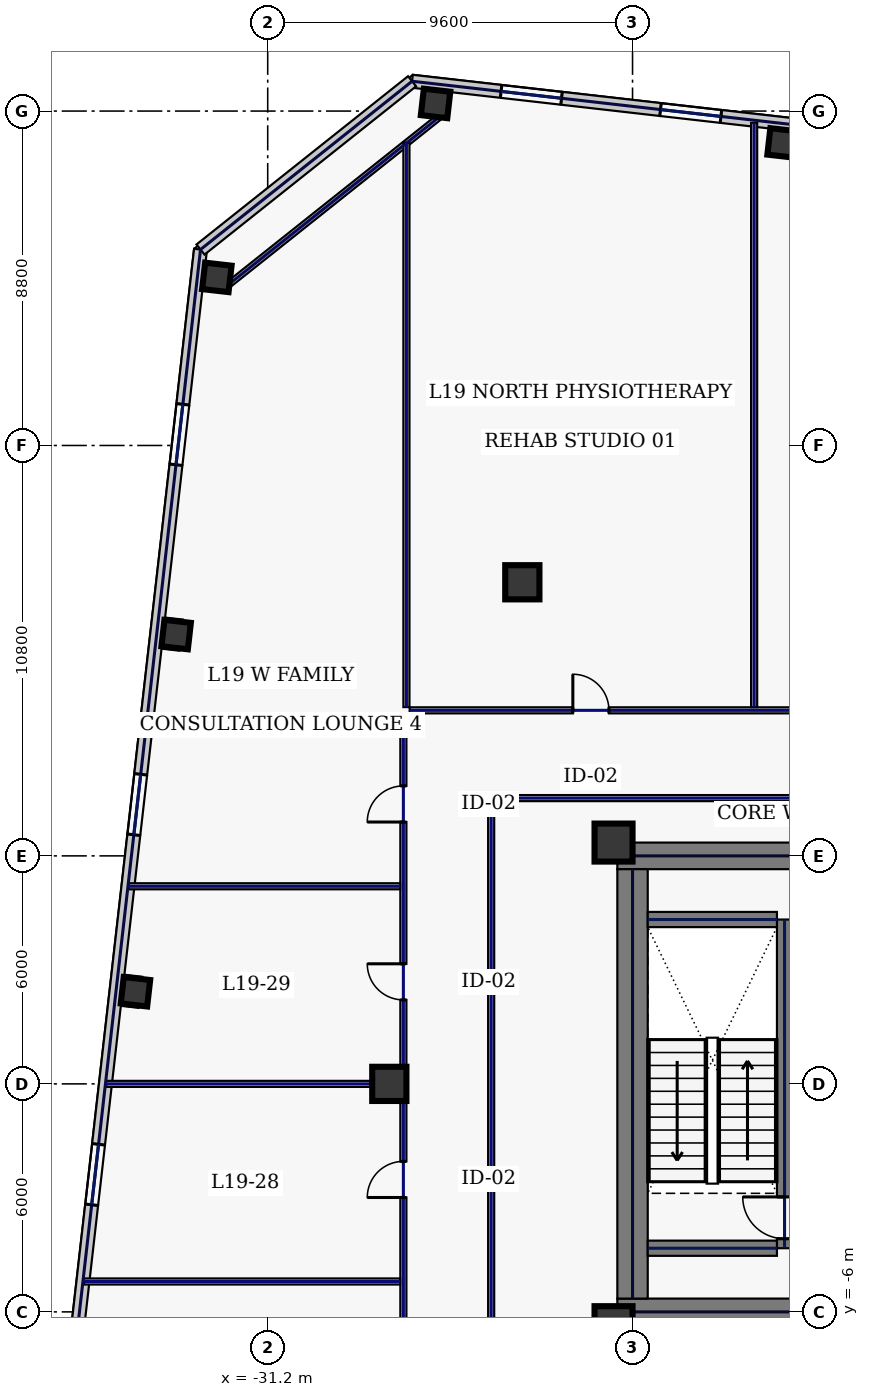
"""IFC4 building model, lengths in metres.
Left out: names, types, materials, properties, quantities, classifications, styles, units other than length and angle.
Written with IfcOpenShell. Run it as: python <this file> out.ifc"""

import sys

from ifc_helpers import new_model, si_unit, direction, frame, frame_2d, origin, origin_2d, place, context, subcontext, project, spatial, rectangle, hollow_rectangle, extrude, element, fill, save


model = new_model("IFC4")
c1 = context("Model", 3, precision=1e-05, world=origin(), true_north=direction((0.0, 1.0)))
c2 = subcontext(c1, "Body", "Model", "MODEL_VIEW")
j1 = project(units=[si_unit("LENGTHUNIT", "METRE"), si_unit("PLANEANGLEUNIT", "RADIAN")], contexts=[c1])
p1 = place(None, origin())
s1 = spatial("IfcSite", under=j1, at=p1, CompositionType="ELEMENT")
p2 = place(p1, origin())
s2 = spatial("IfcBuilding", under=s1, at=p2, CompositionType="ELEMENT")
p3 = place(p2, frame((0.0, 0.0, 89.4)))
s3 = spatial("IfcBuildingStorey", under=s2, at=p3, CompositionType="ELEMENT", Elevation=89.4)
for number, where, z_axis, x_axis in (
    (1, (-22.0, 6.0, 0.0), (0.0, 0.0, 1.0), (1.0, 0.0, 0.0)),
    (2, (-22.0, -6.0, 0.0), (0.0, 0.0, 1.0), (1.0, 0.0, 0.0)),
):
    element("IfcWall", number, at=place(p3, frame(where, z_axis=z_axis, x_axis=x_axis)), inside=s3, PredefinedType="SHEAR", context=c2, shape_type="SweptSolid", body=[
        extrude(rectangle(XDim=11.55, YDim=0.7, at=frame_2d((5.775, 0.0))), origin(), (0.0, 0.0, 1.0), 3.74),
    ])
p4 = place(p3, frame((-21.6, -5.65, 0.0), z_axis=(0.0, 0.0, 1.0), x_axis=(0.0, 1.0, 0.0)))
e3 = element("IfcWall", 3, at=p4, inside=s3, PredefinedType="SHEAR", context=c2, shape_type="SweptSolid", body=[
    extrude(rectangle(XDim=11.3, YDim=0.8, at=frame_2d((5.65, 0.0))), origin(), (0.0, 0.0, 1.0), 3.74),
])
p5 = place(p3, frame((-17.6, -4.325, 0.0), z_axis=(0.0, 0.0, 1.0), x_axis=(0.0, 1.0, 0.0)))
e4 = element("IfcWall", 4, at=p5, inside=s3, PredefinedType="SHEAR", context=c2, shape_type="SweptSolid", body=[
    extrude(rectangle(XDim=8.65, YDim=0.4, at=frame_2d((4.325, 0.0))), origin(), (0.0, 0.0, 1.0), 3.74),
])
p6 = place(p5, frame((0.25, 0.0, 0.0)))
e5 = element("IfcOpeningElement", 5, at=p6, cuts=e4, PredefinedType="OPENING", context=c2, shape_type="SweptSolid", body=[
    extrude(rectangle(XDim=1.1, YDim=2.2, at=frame_2d((0.55, 1.1))), frame((0.0, 0.21, 0.0), z_axis=(0.0, -1.0, 0.0), x_axis=(1.0, 0.0, 0.0)), (0.0, 0.0, 1.0), 0.42),
])
for number, where, z_axis, x_axis in (
    (6, (-21.2, -4.325, 0.0), (0.0, 0.0, 1.0), (1.0, 0.0, 0.0)),
    (7, (-21.2, 4.325, 0.0), (0.0, 0.0, 1.0), (1.0, 0.0, 0.0)),
):
    element("IfcWall", number, at=place(p3, frame(where, z_axis=z_axis, x_axis=x_axis)), inside=s3, PredefinedType="SHEAR", context=c2, shape_type="SweptSolid", body=[
        extrude(rectangle(XDim=3.4, YDim=0.4, at=frame_2d((1.7, 0.0))), origin(), (0.0, 0.0, 1.0), 3.74),
    ])
for number, where, z_axis, x_axis in (
    (8, (-22.1, -6.35, 0.0), (0.0, 0.0, 1.0), (1.0, 0.0, 0.0)),
    (9, (-22.1, 6.35, 0.0), (0.0, 0.0, 1.0), (1.0, 0.0, 0.0)),
):
    element("IfcColumn", number, at=place(p3, frame(where, z_axis=z_axis, x_axis=x_axis)), inside=s3, PredefinedType="COLUMN", context=c2, shape_type="SweptSolid", body=[
        extrude(hollow_rectangle(XDim=1.0, YDim=1.0, WallThickness=0.045, at=origin_2d()), origin(), (0.0, 0.0, 1.0), 3.74),
    ])
for number, where, z_axis, x_axis in (
    (10, (-24.5, 13.2, 0.0), (0.0, 0.0, 1.0), (1.0, 0.0, 0.0)),
    (11, (-28.0, 0.0, 0.0), (0.0, 0.0, 1.0), (1.0, 0.0, 0.0)),
):
    element("IfcColumn", number, at=place(p3, frame(where, z_axis=z_axis, x_axis=x_axis)), inside=s3, PredefinedType="COLUMN", context=c2, shape_type="SweptSolid", body=[
        extrude(hollow_rectangle(XDim=0.9, YDim=0.9, WallThickness=0.04, at=origin_2d()), origin(), (0.0, 0.0, 1.0), 3.74),
    ])
for number, where, z_axis, x_axis in (
    (12, (-17.665, 24.762, 0.0), (0.0, 0.0, 1.0), (0.994, -0.113, 0.0)),
    (13, (-26.783, 25.801, 0.0), (0.0, 0.0, 1.0), (0.994, -0.113, 0.0)),
    (14, (-32.538, 21.223, 0.0), (0.0, 0.0, 1.0), (0.994, -0.113, 0.0)),
    (15, (-33.609, 11.824, 0.0), (0.0, 0.0, 1.0), (0.994, -0.113, 0.0)),
    (16, (-34.68, 2.425, 0.0), (0.0, 0.0, 1.0), (0.994, -0.113, 0.0)),
):
    element("IfcColumn", number, at=place(p3, frame(where, z_axis=z_axis, x_axis=x_axis)), inside=s3, PredefinedType="COLUMN", context=c2, shape_type="SweptSolid", body=[
        extrude(hollow_rectangle(XDim=0.7, YDim=0.7, WallThickness=0.032, at=origin_2d()), origin(), (0.0, 0.0, 1.0), 3.74),
    ])
p7 = place(p3, frame((-6.314, 23.982, 0.0), z_axis=(0.0, 0.0, 1.0), x_axis=(-0.993571362037, 0.113207546299, 0.0)))
e17 = element("IfcWall", 17, at=p7, inside=s3, PredefinedType="STANDARD", context=c2, shape_type="SweptSolid", body=[
    extrude(rectangle(XDim=21.223, YDim=0.34, at=frame_2d((10.611, 0.0))), origin(), (0.0, 0.0, 1.0), 3.74),
])
p8 = place(p7, frame((17.265, 0.0, 0.22)))
e18 = element("IfcOpeningElement", 18, at=p8, cuts=e17, PredefinedType="OPENING", context=c2, shape_type="SweptSolid", body=[
    extrude(rectangle(XDim=1.6, YDim=1.2, at=frame_2d((0.8, 0.6))), frame((0.0, 0.18, 0.0), z_axis=(0.0, -1.0, 0.0), x_axis=(1.0, 0.0, 0.0)), (0.0, 0.0, 1.0), 0.36),
])
p9 = place(p7, frame((13.044, 0.0, 0.22)))
e19 = element("IfcOpeningElement", 19, at=p9, cuts=e17, PredefinedType="OPENING", context=c2, shape_type="SweptSolid", body=[
    extrude(rectangle(XDim=1.6, YDim=1.2, at=frame_2d((0.8, 0.6))), frame((0.0, 0.18, 0.0), z_axis=(0.0, -1.0, 0.0), x_axis=(1.0, 0.0, 0.0)), (0.0, 0.0, 1.0), 0.36),
])
p10 = place(p7, frame((8.088, 0.0, 0.22)))
e20 = element("IfcOpeningElement", 20, at=p10, cuts=e17, PredefinedType="OPENING", context=c2, shape_type="SweptSolid", body=[
    extrude(rectangle(XDim=1.6, YDim=1.2, at=frame_2d((0.8, 0.6))), frame((0.0, 0.18, 0.0), z_axis=(0.0, -1.0, 0.0), x_axis=(1.0, 0.0, 0.0)), (0.0, 0.0, 1.0), 0.36),
])
p11 = place(p7, frame((3.866, 0.0, 0.22)))
e21 = element("IfcOpeningElement", 21, at=p11, cuts=e17, PredefinedType="OPENING", context=c2, shape_type="SweptSolid", body=[
    extrude(rectangle(XDim=1.6, YDim=1.2, at=frame_2d((0.8, 0.6))), frame((0.0, 0.18, 0.0), z_axis=(0.0, -1.0, 0.0), x_axis=(1.0, 0.0, 0.0)), (0.0, 0.0, 1.0), 0.36),
])
p12 = place(p3, frame((-32.968, 21.957, 0.0), z_axis=(0.0, 0.0, 1.0), x_axis=(-0.113201605824, -0.993572038877, 0.0)))
e22 = element("IfcWall", 22, at=p12, inside=s3, PredefinedType="STANDARD", context=c2, shape_type="SweptSolid", body=[
    extrude(rectangle(XDim=39.2, YDim=0.34, at=frame_2d((19.6, 0.0))), origin(), (0.0, 0.0, 1.0), 3.74),
])
p13 = place(p12, frame((4.1, 0.0, 0.22)))
e23 = element("IfcOpeningElement", 23, at=p13, cuts=e22, PredefinedType="OPENING", context=c2, shape_type="SweptSolid", body=[
    extrude(rectangle(XDim=1.6, YDim=1.2, at=frame_2d((0.8, 0.6))), frame((0.0, 0.18, 0.0), z_axis=(0.0, -1.0, 0.0), x_axis=(1.0, 0.0, 0.0)), (0.0, 0.0, 1.0), 0.36),
])
p14 = place(p12, frame((13.9, 0.0, 0.22)))
e24 = element("IfcOpeningElement", 24, at=p14, cuts=e22, PredefinedType="OPENING", context=c2, shape_type="SweptSolid", body=[
    extrude(rectangle(XDim=1.6, YDim=1.2, at=frame_2d((0.8, 0.6))), frame((0.0, 0.18, 0.0), z_axis=(0.0, -1.0, 0.0), x_axis=(1.0, 0.0, 0.0)), (0.0, 0.0, 1.0), 0.36),
])
p15 = place(p12, frame((23.7, 0.0, 0.22)))
e25 = element("IfcOpeningElement", 25, at=p15, cuts=e22, PredefinedType="OPENING", context=c2, shape_type="SweptSolid", body=[
    extrude(rectangle(XDim=1.6, YDim=1.2, at=frame_2d((0.8, 0.6))), frame((0.0, 0.18, 0.0), z_axis=(0.0, -1.0, 0.0), x_axis=(1.0, 0.0, 0.0)), (0.0, 0.0, 1.0), 0.36),
])
p16 = place(p12, frame((33.5, 0.0, 0.22)))
e26 = element("IfcOpeningElement", 26, at=p16, cuts=e22, PredefinedType="OPENING", context=c2, shape_type="SweptSolid", body=[
    extrude(rectangle(XDim=1.6, YDim=1.2, at=frame_2d((0.8, 0.6))), frame((0.0, 0.18, 0.0), z_axis=(0.0, -1.0, 0.0), x_axis=(1.0, 0.0, 0.0)), (0.0, 0.0, 1.0), 0.36),
])
p17 = place(p3, frame((-27.401, 26.385, 0.0), z_axis=(0.0, 0.0, 1.0), x_axis=(-0.78261359446, -0.622507800567, 0.0)))
e27 = element("IfcWall", 27, at=p17, inside=s3, PredefinedType="STANDARD", context=c2, shape_type="SweptSolid", body=[
    extrude(rectangle(XDim=7.114, YDim=0.34, at=frame_2d((3.557, 0.0))), origin(), (0.0, 0.0, 1.0), 3.74),
])
p18 = place(p3, frame((-26.571, 25.535, 0.0), z_axis=(0.0, 0.0, 1.0), x_axis=(-0.782617962887, -0.622502308564, 0.0)))
e28 = element("IfcWall", 28, at=p18, inside=s3, PredefinedType="PARTITIONING", context=c2, shape_type="SweptSolid", body=[
    extrude(rectangle(XDim=7.354, YDim=0.16, at=frame_2d((3.677, 0.0))), origin(), (0.0, 0.0, 1.0), 1.535),
])
p19 = place(p3, frame((-27.63, -9.615, 0.0), z_axis=(0.0, 0.0, 1.0), x_axis=(0.0, 1.0, 0.0)))
e29 = element("IfcWall", 29, at=p19, inside=s3, PredefinedType="PARTITIONING", context=c2, shape_type="SweptSolid", body=[
    extrude(rectangle(XDim=19.28, YDim=0.16, at=frame_2d((9.64, 0.0))), origin(), (0.0, 0.0, 1.0), 3.74),
])
p20 = place(p19, frame((1.969, 0.0, 0.0)))
e30 = element("IfcOpeningElement", 30, at=p20, cuts=e29, PredefinedType="OPENING", context=c2, shape_type="SweptSolid", body=[
    extrude(rectangle(XDim=0.95, YDim=2.2, at=frame_2d((0.475, 1.1))), frame((0.0, 0.09, 0.0), z_axis=(0.0, -1.0, 0.0), x_axis=(1.0, 0.0, 0.0)), (0.0, 0.0, 1.0), 0.18),
])
p21 = place(p19, frame((6.625, 0.0, 0.0)))
e31 = element("IfcOpeningElement", 31, at=p21, cuts=e29, PredefinedType="OPENING", context=c2, shape_type="SweptSolid", body=[
    extrude(rectangle(XDim=0.95, YDim=2.2, at=frame_2d((0.475, 1.1))), frame((0.0, 0.09, 0.0), z_axis=(0.0, -1.0, 0.0), x_axis=(1.0, 0.0, 0.0)), (0.0, 0.0, 1.0), 0.18),
])
p22 = place(p19, frame((11.825, 0.0, 0.0)))
e32 = element("IfcOpeningElement", 32, at=p22, cuts=e29, PredefinedType="OPENING", context=c2, shape_type="SweptSolid", body=[
    extrude(rectangle(XDim=0.95, YDim=2.2, at=frame_2d((0.475, 1.1))), frame((0.0, 0.09, 0.0), z_axis=(0.0, -1.0, 0.0), x_axis=(1.0, 0.0, 0.0)), (0.0, 0.0, 1.0), 0.18),
])
p23 = place(p19, frame((16.506, 0.0, 0.0)))
e33 = element("IfcOpeningElement", 33, at=p23, cuts=e29, PredefinedType="OPENING", context=c2, shape_type="SweptSolid", body=[
    extrude(rectangle(XDim=0.95, YDim=2.2, at=frame_2d((0.475, 1.1))), frame((0.0, 0.09, 0.0), z_axis=(0.0, -1.0, 0.0), x_axis=(1.0, 0.0, 0.0)), (0.0, 0.0, 1.0), 0.18),
])
p24 = place(p3, frame((-27.465, 9.83, 0.0), z_axis=(0.0, 0.0, 1.0), x_axis=(1.0, 0.0, 0.0)))
e34 = element("IfcWall", 34, at=p24, inside=s3, PredefinedType="PARTITIONING", context=c2, shape_type="SweptSolid", body=[
    extrude(rectangle(XDim=54.93, YDim=0.16, at=frame_2d((27.465, 0.0))), origin(), (0.0, 0.0, 1.0), 3.74),
])
p25 = place(p24, frame((4.294, 0.0, 0.0)))
e35 = element("IfcOpeningElement", 35, at=p25, cuts=e34, PredefinedType="OPENING", context=c2, shape_type="SweptSolid", body=[
    extrude(rectangle(XDim=0.95, YDim=2.2, at=frame_2d((0.475, 1.1))), frame((0.0, 0.09, 0.0), z_axis=(0.0, -1.0, 0.0), x_axis=(1.0, 0.0, 0.0)), (0.0, 0.0, 1.0), 0.18),
])
p26 = place(p24, frame((13.84, 0.0, 0.0)))
e36 = element("IfcOpeningElement", 36, at=p26, cuts=e34, PredefinedType="OPENING", context=c2, shape_type="SweptSolid", body=[
    extrude(rectangle(XDim=1.3, YDim=2.2, at=frame_2d((0.65, 1.1))), frame((0.0, 0.09, 0.0), z_axis=(0.0, -1.0, 0.0), x_axis=(1.0, 0.0, 0.0)), (0.0, 0.0, 1.0), 0.18),
])
p27 = place(p24, frame((23.995, 0.0, 0.0)))
e37 = element("IfcOpeningElement", 37, at=p27, cuts=e34, PredefinedType="OPENING", context=c2, shape_type="SweptSolid", body=[
    extrude(rectangle(XDim=0.95, YDim=2.2, at=frame_2d((0.475, 1.1))), frame((0.0, 0.09, 0.0), z_axis=(0.0, -1.0, 0.0), x_axis=(1.0, 0.0, 0.0)), (0.0, 0.0, 1.0), 0.18),
])
p28 = place(p24, frame((32.335, 0.0, 0.0)))
e38 = element("IfcOpeningElement", 38, at=p28, cuts=e34, PredefinedType="OPENING", context=c2, shape_type="SweptSolid", body=[
    extrude(rectangle(XDim=1.05, YDim=2.2, at=frame_2d((0.525, 1.1))), frame((0.0, 0.09, 0.0), z_axis=(0.0, -1.0, 0.0), x_axis=(1.0, 0.0, 0.0)), (0.0, 0.0, 1.0), 0.18),
])
p29 = place(p24, frame((40.455, 0.0, 0.0)))
e39 = element("IfcOpeningElement", 39, at=p29, cuts=e34, PredefinedType="OPENING", context=c2, shape_type="SweptSolid", body=[
    extrude(rectangle(XDim=0.95, YDim=2.2, at=frame_2d((0.475, 1.1))), frame((0.0, 0.09, 0.0), z_axis=(0.0, -1.0, 0.0), x_axis=(1.0, 0.0, 0.0)), (0.0, 0.0, 1.0), 0.18),
])
p30 = place(p24, frame((49.381, 0.0, 0.0)))
e40 = element("IfcOpeningElement", 40, at=p30, cuts=e34, PredefinedType="OPENING", context=c2, shape_type="SweptSolid", body=[
    extrude(rectangle(XDim=1.3, YDim=2.2, at=frame_2d((0.65, 1.1))), frame((0.0, 0.09, 0.0), z_axis=(0.0, -1.0, 0.0), x_axis=(1.0, 0.0, 0.0)), (0.0, 0.0, 1.0), 0.18),
])
p31 = place(p3, frame((-10.665, 7.52, 0.0), z_axis=(0.0, 0.0, 1.0), x_axis=(-1.0, 0.0, 0.0)))
e41 = element("IfcWall", 41, at=p31, inside=s3, PredefinedType="PARTITIONING", context=c2, shape_type="SweptSolid", body=[
    extrude(rectangle(XDim=14.57, YDim=0.16, at=frame_2d((7.285, 0.0))), origin(), (0.0, 0.0, 1.0), 3.74),
])
p32 = place(p3, frame((-25.32, 7.435, 0.0), z_axis=(0.0, 0.0, 1.0), x_axis=(0.0, -1.0, 0.0)))
e42 = element("IfcWall", 42, at=p32, inside=s3, PredefinedType="PARTITIONING", context=c2, shape_type="SweptSolid", body=[
    extrude(rectangle(XDim=14.82, YDim=0.16, at=frame_2d((7.41, 0.0))), origin(), (0.0, 0.0, 1.0), 3.74),
])
p33 = place(p3, frame((-27.55, 9.915, 0.0), z_axis=(0.0, 0.0, 1.0), x_axis=(0.0, 1.0, 0.0)))
e43 = element("IfcWall", 43, at=p33, inside=s3, PredefinedType="PARTITIONING", context=c2, shape_type="SweptSolid", body=[
    extrude(rectangle(XDim=14.859, YDim=0.16, at=frame_2d((7.429, 0.0))), origin(), (0.0, 0.0, 1.0), 3.74),
])
p34 = place(p3, frame((-18.4, 9.915, 0.0), z_axis=(0.0, 0.0, 1.0), x_axis=(0.0, 1.0, 0.0)))
e44 = element("IfcWall", 44, at=p34, inside=s3, PredefinedType="PARTITIONING", context=c2, shape_type="SweptSolid", body=[
    extrude(rectangle(XDim=15.374, YDim=0.16, at=frame_2d((7.687, 0.0))), origin(), (0.0, 0.0, 1.0), 3.74),
])
p35 = place(p3, frame((-36.042, -5.2, 0.0), z_axis=(0.0, 0.0, 1.0), x_axis=(1.0, 0.0, 0.0)))
e45 = element("IfcWall", 45, at=p35, inside=s3, PredefinedType="PARTITIONING", context=c2, shape_type="SweptSolid", body=[
    extrude(rectangle(XDim=8.327, YDim=0.16, at=frame_2d((4.164, 0.0))), origin(), (0.0, 0.0, 1.0), 3.74),
])
p36 = place(p3, frame((-35.449, 0.0, 0.0), z_axis=(0.0, 0.0, 1.0), x_axis=(1.0, 0.0, 0.0)))
e46 = element("IfcWall", 46, at=p36, inside=s3, PredefinedType="PARTITIONING", context=c2, shape_type="SweptSolid", body=[
    extrude(rectangle(XDim=7.734, YDim=0.16, at=frame_2d((3.867, 0.0))), origin(), (0.0, 0.0, 1.0), 3.74),
])
p37 = place(p3, frame((-34.857, 5.2, 0.0), z_axis=(0.0, 0.0, 1.0), x_axis=(1.0, 0.0, 0.0)))
e47 = element("IfcWall", 47, at=p37, inside=s3, PredefinedType="PARTITIONING", context=c2, shape_type="SweptSolid", body=[
    extrude(rectangle(XDim=7.142, YDim=0.16, at=frame_2d((3.571, 0.0))), origin(), (0.0, 0.0, 1.0), 3.74),
])
p38 = place(p8, origin())
e48 = element("IfcWindow", 48, at=p38, inside=s3, PartitioningType="SINGLE_PANEL", PredefinedType="WINDOW", context=c2, shape_type="SweptSolid", body=[
    extrude(rectangle(XDim=1.6, YDim=1.2, at=frame_2d((0.8, 0.6))), frame((0.0, 0.03, 0.0), z_axis=(0.0, -1.0, 0.0), x_axis=(1.0, 0.0, 0.0)), (0.0, 0.0, 1.0), 0.06),
])
fill(e18, e48)
p39 = place(p9, origin())
e49 = element("IfcWindow", 49, at=p39, inside=s3, PartitioningType="SINGLE_PANEL", PredefinedType="WINDOW", context=c2, shape_type="SweptSolid", body=[
    extrude(rectangle(XDim=1.6, YDim=1.2, at=frame_2d((0.8, 0.6))), frame((0.0, 0.03, 0.0), z_axis=(0.0, -1.0, 0.0), x_axis=(1.0, 0.0, 0.0)), (0.0, 0.0, 1.0), 0.06),
])
fill(e19, e49)
p40 = place(p13, origin())
e50 = element("IfcWindow", 50, at=p40, inside=s3, PartitioningType="SINGLE_PANEL", PredefinedType="WINDOW", context=c2, shape_type="SweptSolid", body=[
    extrude(rectangle(XDim=1.6, YDim=1.2, at=frame_2d((0.8, 0.6))), frame((0.0, 0.03, 0.0), z_axis=(0.0, -1.0, 0.0), x_axis=(1.0, 0.0, 0.0)), (0.0, 0.0, 1.0), 0.06),
])
fill(e23, e50)
p41 = place(p14, origin())
e51 = element("IfcWindow", 51, at=p41, inside=s3, PartitioningType="SINGLE_PANEL", PredefinedType="WINDOW", context=c2, shape_type="SweptSolid", body=[
    extrude(rectangle(XDim=1.6, YDim=1.2, at=frame_2d((0.8, 0.6))), frame((0.0, 0.03, 0.0), z_axis=(0.0, -1.0, 0.0), x_axis=(1.0, 0.0, 0.0)), (0.0, 0.0, 1.0), 0.06),
])
fill(e24, e51)
p42 = place(p15, origin())
e52 = element("IfcWindow", 52, at=p42, inside=s3, PartitioningType="SINGLE_PANEL", PredefinedType="WINDOW", context=c2, shape_type="SweptSolid", body=[
    extrude(rectangle(XDim=1.6, YDim=1.2, at=frame_2d((0.8, 0.6))), frame((0.0, 0.03, 0.0), z_axis=(0.0, -1.0, 0.0), x_axis=(1.0, 0.0, 0.0)), (0.0, 0.0, 1.0), 0.06),
])
fill(e25, e52)
p43 = place(p6, origin())
e53 = element("IfcDoor", 53, at=p43, inside=s3, OperationType="SINGLE_SWING_RIGHT", PredefinedType="DOOR", context=c2, shape_type="SweptSolid", body=[
    extrude(rectangle(XDim=1.1, YDim=2.2, at=frame_2d((0.55, 1.1))), frame((0.0, 0.025, 0.0), z_axis=(0.0, -1.0, 0.0), x_axis=(1.0, 0.0, 0.0)), (0.0, 0.0, 1.0), 0.05),
])
fill(e5, e53)
p44 = place(p25, origin())
e54 = element("IfcDoor", 54, at=p44, inside=s3, OperationType="SINGLE_SWING_LEFT", PredefinedType="DOOR", context=c2, shape_type="SweptSolid", body=[
    extrude(rectangle(XDim=0.95, YDim=2.2, at=frame_2d((0.475, 1.1))), frame((0.0, 0.025, 0.0), z_axis=(0.0, -1.0, 0.0), x_axis=(1.0, 0.0, 0.0)), (0.0, 0.0, 1.0), 0.05),
])
fill(e35, e54)
p45 = place(p21, origin())
e55 = element("IfcDoor", 55, at=p45, inside=s3, OperationType="SINGLE_SWING_LEFT", PredefinedType="DOOR", context=c2, shape_type="SweptSolid", body=[
    extrude(rectangle(XDim=0.95, YDim=2.2, at=frame_2d((0.475, 1.1))), frame((0.0, 0.025, 0.0), z_axis=(0.0, -1.0, 0.0), x_axis=(1.0, 0.0, 0.0)), (0.0, 0.0, 1.0), 0.05),
])
fill(e31, e55)
p46 = place(p22, origin())
e56 = element("IfcDoor", 56, at=p46, inside=s3, OperationType="SINGLE_SWING_RIGHT", PredefinedType="DOOR", context=c2, shape_type="SweptSolid", body=[
    extrude(rectangle(XDim=0.95, YDim=2.2, at=frame_2d((0.475, 1.1))), frame((0.0, 0.025, 0.0), z_axis=(0.0, -1.0, 0.0), x_axis=(1.0, 0.0, 0.0)), (0.0, 0.0, 1.0), 0.05),
])
fill(e32, e56)
p47 = place(p23, origin())
e57 = element("IfcDoor", 57, at=p47, inside=s3, OperationType="SINGLE_SWING_LEFT", PredefinedType="DOOR", context=c2, shape_type="SweptSolid", body=[
    extrude(rectangle(XDim=0.95, YDim=2.2, at=frame_2d((0.475, 1.1))), frame((0.0, 0.025, 0.0), z_axis=(0.0, -1.0, 0.0), x_axis=(1.0, 0.0, 0.0)), (0.0, 0.0, 1.0), 0.05),
])
fill(e33, e57)
save(model, sys.argv[1])
